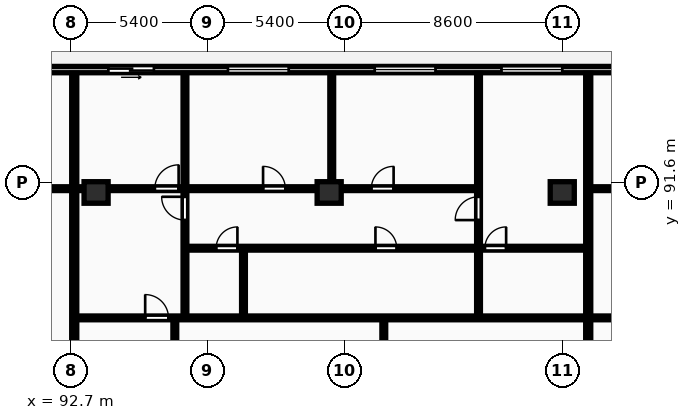
"""IFC4 building model, lengths in metres.
Left out: names, types, materials, properties, quantities, classifications, styles, units other than length and angle.
Written with IfcOpenShell. Run it as: python <this file> out.ifc"""

import sys

from ifc_helpers import new_model, si_unit, direction, frame, frame_2d, origin, origin_2d, place, context, subcontext, project, spatial, rectangle, extrude, element, fill, save


model = new_model("IFC4")
c1 = context("Model", 3, precision=1e-05, world=origin(), true_north=direction((0.0, 1.0)))
c2 = subcontext(c1, "Body", "Model", "MODEL_VIEW")
j1 = project(units=[si_unit("LENGTHUNIT", "METRE"), si_unit("PLANEANGLEUNIT", "RADIAN")], contexts=[c1])
p1 = place(None, origin())
s1 = spatial("IfcSite", under=j1, at=p1, CompositionType="ELEMENT")
p2 = place(p1, origin())
s2 = spatial("IfcBuilding", under=s1, at=p2, CompositionType="ELEMENT")
p3 = place(p2, frame((0.0, 0.0, 132.8)))
s3 = spatial("IfcBuildingStorey", under=s2, at=p3, CompositionType="ELEMENT", Elevation=132.8)
for number, where, z_axis, x_axis in (
    (1, (93.7, 91.2, 0.0), (0.0, 0.0, 1.0), (1.0, 0.0, 0.0)),
    (2, (102.9, 91.2, 0.0), (0.0, 0.0, 1.0), (1.0, 0.0, 0.0)),
    (3, (112.1, 91.2, 0.0), (0.0, 0.0, 1.0), (1.0, 0.0, 0.0)),
):
    element("IfcColumn", number, at=place(p3, frame(where, z_axis=z_axis, x_axis=x_axis)), inside=s3, PredefinedType="COLUMN", context=c2, shape_type="SweptSolid", body=[
        extrude(rectangle(XDim=0.95, YDim=0.85, at=origin_2d()), origin(), (0.0, 0.0, 1.0), 3.25),
    ])
p4 = place(p3, frame((130.6, 96.05, 0.0), z_axis=(0.0, 0.0, 1.0), x_axis=(-1.0, 0.0, 0.0)))
e4 = element("IfcWall", 4, at=p4, inside=s3, PredefinedType="STANDARD", context=c2, shape_type="SweptSolid", body=[
    extrude(rectangle(XDim=73.0, YDim=0.25, at=frame_2d((36.5, 0.0))), origin(), (0.0, 0.0, 1.0), 2.97),
])
p5 = place(p4, frame((68.591, 0.0, 0.0)))
e5 = element("IfcOpeningElement", 5, at=p5, cuts=e4, PredefinedType="OPENING", context=c2, shape_type="SweptSolid", body=[
    extrude(rectangle(XDim=1.8, YDim=2.2, at=frame_2d((0.9, 1.1))), frame((0.0, 0.135, 0.0), z_axis=(0.0, -1.0, 0.0), x_axis=(1.0, 0.0, 0.0)), (0.0, 0.0, 1.0), 0.27),
])
p6 = place(p4, frame((60.092, 0.0, 0.85)))
e6 = element("IfcOpeningElement", 6, at=p6, cuts=e4, PredefinedType="OPENING", context=c2, shape_type="SweptSolid", body=[
    extrude(rectangle(XDim=2.4, YDim=1.9, at=frame_2d((1.2, 0.95))), frame((0.0, 0.135, 0.0), z_axis=(0.0, -1.0, 0.0), x_axis=(1.0, 0.0, 0.0)), (0.0, 0.0, 1.0), 0.27),
])
p7 = place(p4, frame((51.405, 0.0, 0.0)))
e7 = element("IfcOpeningElement", 7, at=p7, cuts=e4, PredefinedType="OPENING", context=c2, shape_type="SweptSolid", body=[
    extrude(rectangle(XDim=1.8, YDim=2.2, at=frame_2d((0.9, 1.1))), frame((0.0, 0.135, 0.0), z_axis=(0.0, -1.0, 0.0), x_axis=(1.0, 0.0, 0.0)), (0.0, 0.0, 1.0), 0.27),
])
p8 = place(p4, frame((41.925, 0.0, 0.85)))
e8 = element("IfcOpeningElement", 8, at=p8, cuts=e4, PredefinedType="OPENING", context=c2, shape_type="SweptSolid", body=[
    extrude(rectangle(XDim=2.4, YDim=1.9, at=frame_2d((1.2, 0.95))), frame((0.0, 0.135, 0.0), z_axis=(0.0, -1.0, 0.0), x_axis=(1.0, 0.0, 0.0)), (0.0, 0.0, 1.0), 0.27),
])
p9 = place(p4, frame((29.296, 0.0, 0.85)))
e9 = element("IfcOpeningElement", 9, at=p9, cuts=e4, PredefinedType="OPENING", context=c2, shape_type="SweptSolid", body=[
    extrude(rectangle(XDim=2.4, YDim=1.9, at=frame_2d((1.2, 0.95))), frame((0.0, 0.135, 0.0), z_axis=(0.0, -1.0, 0.0), x_axis=(1.0, 0.0, 0.0)), (0.0, 0.0, 1.0), 0.27),
])
p10 = place(p4, frame((23.502, 0.0, 0.85)))
e10 = element("IfcOpeningElement", 10, at=p10, cuts=e4, PredefinedType="OPENING", context=c2, shape_type="SweptSolid", body=[
    extrude(rectangle(XDim=2.4, YDim=1.9, at=frame_2d((1.2, 0.95))), frame((0.0, 0.135, 0.0), z_axis=(0.0, -1.0, 0.0), x_axis=(1.0, 0.0, 0.0)), (0.0, 0.0, 1.0), 0.27),
])
p11 = place(p4, frame((34.617, 0.0, 0.0)))
e11 = element("IfcOpeningElement", 11, at=p11, cuts=e4, PredefinedType="OPENING", context=c2, shape_type="SweptSolid", body=[
    extrude(rectangle(XDim=1.8, YDim=2.2, at=frame_2d((0.9, 1.1))), frame((0.0, 0.135, 0.0), z_axis=(0.0, -1.0, 0.0), x_axis=(1.0, 0.0, 0.0)), (0.0, 0.0, 1.0), 0.27),
])
p12 = place(p4, frame((18.5, 0.0, 0.85)))
e12 = element("IfcOpeningElement", 12, at=p12, cuts=e4, PredefinedType="OPENING", context=c2, shape_type="SweptSolid", body=[
    extrude(rectangle(XDim=2.4, YDim=1.9, at=frame_2d((1.2, 0.95))), frame((0.0, 0.135, 0.0), z_axis=(0.0, -1.0, 0.0), x_axis=(1.0, 0.0, 0.0)), (0.0, 0.0, 1.0), 0.27),
])
p13 = place(p4, frame((9.458, 0.0, 0.85)))
e13 = element("IfcOpeningElement", 13, at=p13, cuts=e4, PredefinedType="OPENING", context=c2, shape_type="SweptSolid", body=[
    extrude(rectangle(XDim=2.4, YDim=1.9, at=frame_2d((1.2, 0.95))), frame((0.0, 0.135, 0.0), z_axis=(0.0, -1.0, 0.0), x_axis=(1.0, 0.0, 0.0)), (0.0, 0.0, 1.0), 0.27),
])
p14 = place(p4, frame((5.695, 0.0, 0.85)))
e14 = element("IfcOpeningElement", 14, at=p14, cuts=e4, PredefinedType="OPENING", context=c2, shape_type="SweptSolid", body=[
    extrude(rectangle(XDim=1.8, YDim=1.8, at=frame_2d((0.9, 0.9))), frame((0.0, 0.135, 0.0), z_axis=(0.0, -1.0, 0.0), x_axis=(1.0, 0.0, 0.0)), (0.0, 0.0, 1.0), 0.27),
])
p15 = place(p4, frame((14.225, 0.0, 0.0)))
e15 = element("IfcOpeningElement", 15, at=p15, cuts=e4, PredefinedType="OPENING", context=c2, shape_type="SweptSolid", body=[
    extrude(rectangle(XDim=1.8, YDim=2.2, at=frame_2d((0.9, 1.1))), frame((0.0, 0.135, 0.0), z_axis=(0.0, -1.0, 0.0), x_axis=(1.0, 0.0, 0.0)), (0.0, 0.0, 1.0), 0.27),
])
p16 = place(p4, frame((1.245, 0.0, 0.85)))
e16 = element("IfcOpeningElement", 16, at=p16, cuts=e4, PredefinedType="OPENING", context=c2, shape_type="SweptSolid", body=[
    extrude(rectangle(XDim=2.4, YDim=1.9, at=frame_2d((1.2, 0.95))), frame((0.0, 0.135, 0.0), z_axis=(0.0, -1.0, 0.0), x_axis=(1.0, 0.0, 0.0)), (0.0, 0.0, 1.0), 0.27),
])
p17 = place(p3, frame((92.837, 69.83, 0.0), z_axis=(0.0, 0.0, 1.0), x_axis=(0.0, 1.0, 0.0)))
e17 = element("IfcWall", 17, at=p17, inside=s3, PredefinedType="PARTITIONING", context=c2, shape_type="SweptSolid", body=[
    extrude(rectangle(XDim=26.07, YDim=0.2, at=frame_2d((13.035, 0.0))), origin(), (0.0, 0.0, 1.0), 2.97),
])
p18 = place(p3, frame((74.317, 91.35, 0.0), z_axis=(0.0, 0.0, 1.0), x_axis=(1.0, 0.0, 0.0)))
e18 = element("IfcWall", 18, at=p18, inside=s3, PredefinedType="PARTITIONING", context=c2, shape_type="SweptSolid", body=[
    extrude(rectangle(XDim=18.44, YDim=0.15, at=frame_2d((9.22, 0.0))), origin(), (0.0, 0.0, 1.0), 2.663),
])
p19 = place(p18, frame((6.725, 0.0, 0.0)))
e19 = element("IfcOpeningElement", 19, at=p19, cuts=e18, PredefinedType="OPENING", context=c2, shape_type="SweptSolid", body=[
    extrude(rectangle(XDim=0.94, YDim=2.1, at=frame_2d((0.47, 1.05))), frame((0.0, 0.085, 0.0), z_axis=(0.0, -1.0, 0.0), x_axis=(1.0, 0.0, 0.0)), (0.0, 0.0, 1.0), 0.17),
])
p20 = place(p18, frame((11.938, 0.0, 0.0)))
e20 = element("IfcOpeningElement", 20, at=p20, cuts=e18, PredefinedType="OPENING", context=c2, shape_type="SweptSolid", body=[
    extrude(rectangle(XDim=0.94, YDim=2.1, at=frame_2d((0.47, 1.05))), frame((0.0, 0.085, 0.0), z_axis=(0.0, -1.0, 0.0), x_axis=(1.0, 0.0, 0.0)), (0.0, 0.0, 1.0), 0.17),
])
p21 = place(p3, frame((113.125, 69.83, 0.0), z_axis=(0.0, 0.0, 1.0), x_axis=(0.0, 1.0, 0.0)))
e21 = element("IfcWall", 21, at=p21, inside=s3, PredefinedType="PARTITIONING", context=c2, shape_type="SweptSolid", body=[
    extrude(rectangle(XDim=26.07, YDim=0.2, at=frame_2d((13.035, 0.0))), origin(), (0.0, 0.0, 1.0), 2.97),
])
p22 = place(p3, frame((105.056, 69.81, 0.0), z_axis=(0.0, 0.0, 1.0), x_axis=(0.0, 1.0, 0.0)))
e22 = element("IfcWall", 22, at=p22, inside=s3, PredefinedType="PARTITIONING", context=c2, shape_type="SweptSolid", body=[
    extrude(rectangle(XDim=16.4, YDim=0.15, at=frame_2d((8.2, 0.0))), origin(), (0.0, 0.0, 1.0), 2.97),
])
p23 = place(p22, frame((6.93, 0.0, 0.0)))
e23 = element("IfcOpeningElement", 23, at=p23, cuts=e22, PredefinedType="OPENING", context=c2, shape_type="SweptSolid", body=[
    extrude(rectangle(XDim=0.84, YDim=2.04, at=frame_2d((0.42, 1.02))), frame((0.0, 0.085, 0.0), z_axis=(0.0, -1.0, 0.0), x_axis=(1.0, 0.0, 0.0)), (0.0, 0.0, 1.0), 0.17),
])
p24 = place(p22, frame((11.582, 0.0, 0.0)))
e24 = element("IfcOpeningElement", 24, at=p24, cuts=e22, PredefinedType="OPENING", context=c2, shape_type="SweptSolid", body=[
    extrude(rectangle(XDim=0.88, YDim=2.06, at=frame_2d((0.44, 1.03))), frame((0.0, 0.085, 0.0), z_axis=(0.0, -1.0, 0.0), x_axis=(1.0, 0.0, 0.0)), (0.0, 0.0, 1.0), 0.17),
])
p25 = place(p3, frame((96.808, 69.81, 0.0), z_axis=(0.0, 0.0, 1.0), x_axis=(0.0, 1.0, 0.0)))
e25 = element("IfcWall", 25, at=p25, inside=s3, PredefinedType="PARTITIONING", context=c2, shape_type="SweptSolid", body=[
    extrude(rectangle(XDim=16.4, YDim=0.15, at=frame_2d((8.2, 0.0))), origin(), (0.0, 0.0, 1.0), 2.97),
])
p26 = place(p25, frame((6.89, 0.0, 0.0)))
e26 = element("IfcOpeningElement", 26, at=p26, cuts=e25, PredefinedType="OPENING", context=c2, shape_type="SweptSolid", body=[
    extrude(rectangle(XDim=0.88, YDim=2.06, at=frame_2d((0.44, 1.03))), frame((0.0, 0.085, 0.0), z_axis=(0.0, -1.0, 0.0), x_axis=(1.0, 0.0, 0.0)), (0.0, 0.0, 1.0), 0.17),
])
p27 = place(p3, frame((99.518, 86.29, 0.0), z_axis=(0.0, 0.0, 1.0), x_axis=(0.0, 1.0, 0.0)))
e27 = element("IfcWall", 27, at=p27, inside=s3, PredefinedType="PARTITIONING", context=c2, shape_type="SweptSolid", body=[
    extrude(rectangle(XDim=2.69, YDim=0.15, at=frame_2d((1.345, 0.0))), origin(), (0.0, 0.0, 1.0), 2.97),
])
p28 = place(p3, frame((103.001, 91.43, 0.0), z_axis=(0.0, 0.0, 1.0), x_axis=(0.0, 1.0, 0.0)))
e28 = element("IfcWall", 28, at=p28, inside=s3, PredefinedType="PARTITIONING", context=c2, shape_type="SweptSolid", body=[
    extrude(rectangle(XDim=4.47, YDim=0.15, at=frame_2d((2.235, 0.0))), origin(), (0.0, 0.0, 1.0), 2.97),
])
p29 = place(p3, frame((97.208, 86.29, 0.0), z_axis=(0.0, 0.0, 1.0), x_axis=(0.0, 1.0, 0.0)))
e29 = element("IfcWall", 29, at=p29, inside=s3, PredefinedType="PARTITIONING", context=c2, shape_type="SweptSolid", body=[
    extrude(rectangle(XDim=9.61, YDim=0.15, at=frame_2d((4.805, 0.0))), origin(), (0.0, 0.0, 1.0), 2.97),
])
p30 = place(p29, frame((3.82, 0.0, 0.0)))
e30 = element("IfcOpeningElement", 30, at=p30, cuts=e29, PredefinedType="OPENING", context=c2, shape_type="SweptSolid", body=[
    extrude(rectangle(XDim=0.92, YDim=2.08, at=frame_2d((0.46, 1.04))), frame((0.0, 0.085, 0.0), z_axis=(0.0, -1.0, 0.0), x_axis=(1.0, 0.0, 0.0)), (0.0, 0.0, 1.0), 0.17),
])
p31 = place(p3, frame((108.795, 86.29, 0.0), z_axis=(0.0, 0.0, 1.0), x_axis=(0.0, 1.0, 0.0)))
e31 = element("IfcWall", 31, at=p31, inside=s3, PredefinedType="PARTITIONING", context=c2, shape_type="SweptSolid", body=[
    extrude(rectangle(XDim=2.69, YDim=0.15, at=frame_2d((1.345, 0.0))), origin(), (0.0, 0.0, 1.0), 2.97),
])
p32 = place(p3, frame((108.795, 89.02, 0.0), z_axis=(0.0, 0.0, 1.0), x_axis=(0.0, 1.0, 0.0)))
e32 = element("IfcWall", 32, at=p32, inside=s3, PredefinedType="PARTITIONING", context=c2, shape_type="SweptSolid", body=[
    extrude(rectangle(XDim=6.88, YDim=0.15, at=frame_2d((3.44, 0.0))), origin(), (0.0, 0.0, 1.0), 2.97),
])
p33 = place(p32, frame((1.09, 0.0, 0.0)))
e33 = element("IfcOpeningElement", 33, at=p33, cuts=e32, PredefinedType="OPENING", context=c2, shape_type="SweptSolid", body=[
    extrude(rectangle(XDim=0.92, YDim=2.08, at=frame_2d((0.46, 1.04))), frame((0.0, 0.085, 0.0), z_axis=(0.0, -1.0, 0.0), x_axis=(1.0, 0.0, 0.0)), (0.0, 0.0, 1.0), 0.17),
])
p34 = place(p3, frame((97.248, 89.0, 0.0), z_axis=(0.0, 0.0, 1.0), x_axis=(1.0, 0.0, 0.0)))
e34 = element("IfcWall", 34, at=p34, inside=s3, PredefinedType="PARTITIONING", context=c2, shape_type="SweptSolid", body=[
    extrude(rectangle(XDim=15.797, YDim=0.15, at=frame_2d((7.899, 0.0))), origin(), (0.0, 0.0, 1.0), 2.97),
])
p35 = place(p34, frame((1.191, 0.0, 0.0)))
e35 = element("IfcOpeningElement", 35, at=p35, cuts=e34, PredefinedType="OPENING", context=c2, shape_type="SweptSolid", body=[
    extrude(rectangle(XDim=0.84, YDim=2.04, at=frame_2d((0.42, 1.02))), frame((0.0, 0.085, 0.0), z_axis=(0.0, -1.0, 0.0), x_axis=(1.0, 0.0, 0.0)), (0.0, 0.0, 1.0), 0.17),
])
p36 = place(p34, frame((7.479, 0.0, 0.0)))
e36 = element("IfcOpeningElement", 36, at=p36, cuts=e34, PredefinedType="OPENING", context=c2, shape_type="SweptSolid", body=[
    extrude(rectangle(XDim=0.84, YDim=2.04, at=frame_2d((0.42, 1.02))), frame((0.0, 0.085, 0.0), z_axis=(0.0, -1.0, 0.0), x_axis=(1.0, 0.0, 0.0)), (0.0, 0.0, 1.0), 0.17),
])
p37 = place(p34, frame((11.798, 0.0, 0.0)))
e37 = element("IfcOpeningElement", 37, at=p37, cuts=e34, PredefinedType="OPENING", context=c2, shape_type="SweptSolid", body=[
    extrude(rectangle(XDim=0.84, YDim=2.04, at=frame_2d((0.42, 1.02))), frame((0.0, 0.085, 0.0), z_axis=(0.0, -1.0, 0.0), x_axis=(1.0, 0.0, 0.0)), (0.0, 0.0, 1.0), 0.17),
])
p38 = place(p3, frame((92.917, 86.25, 0.0), z_axis=(0.0, 0.0, 1.0), x_axis=(1.0, 0.0, 0.0)))
e38 = element("IfcWall", 38, at=p38, inside=s3, PredefinedType="PARTITIONING", context=c2, shape_type="SweptSolid", body=[
    extrude(rectangle(XDim=20.127, YDim=0.15, at=frame_2d((10.064, 0.0))), origin(), (0.0, 0.0, 1.0), 2.97),
])
p39 = place(p38, frame((2.72, 0.0, 0.0)))
e39 = element("IfcOpeningElement", 39, at=p39, cuts=e38, PredefinedType="OPENING", context=c2, shape_type="SweptSolid", body=[
    extrude(rectangle(XDim=0.92, YDim=2.08, at=frame_2d((0.46, 1.04))), frame((0.0, 0.085, 0.0), z_axis=(0.0, -1.0, 0.0), x_axis=(1.0, 0.0, 0.0)), (0.0, 0.0, 1.0), 0.17),
])
p40 = place(p3, frame((92.917, 91.35, 0.0), z_axis=(0.0, 0.0, 1.0), x_axis=(1.0, 0.0, 0.0)))
e40 = element("IfcWall", 40, at=p40, inside=s3, PredefinedType="PARTITIONING", context=c2, shape_type="SweptSolid", body=[
    extrude(rectangle(XDim=15.877, YDim=0.15, at=frame_2d((7.939, 0.0))), origin(), (0.0, 0.0, 1.0), 2.663),
])
p41 = place(p40, frame((3.1, 0.0, 0.0)))
e41 = element("IfcOpeningElement", 41, at=p41, cuts=e40, PredefinedType="OPENING", context=c2, shape_type="SweptSolid", body=[
    extrude(rectangle(XDim=0.94, YDim=2.1, at=frame_2d((0.47, 1.05))), frame((0.0, 0.085, 0.0), z_axis=(0.0, -1.0, 0.0), x_axis=(1.0, 0.0, 0.0)), (0.0, 0.0, 1.0), 0.17),
])
p42 = place(p40, frame((7.373, 0.0, 0.0)))
e42 = element("IfcOpeningElement", 42, at=p42, cuts=e40, PredefinedType="OPENING", context=c2, shape_type="SweptSolid", body=[
    extrude(rectangle(XDim=0.88, YDim=2.06, at=frame_2d((0.44, 1.03))), frame((0.0, 0.085, 0.0), z_axis=(0.0, -1.0, 0.0), x_axis=(1.0, 0.0, 0.0)), (0.0, 0.0, 1.0), 0.17),
])
p43 = place(p40, frame((11.646, 0.0, 0.0)))
e43 = element("IfcOpeningElement", 43, at=p43, cuts=e40, PredefinedType="OPENING", context=c2, shape_type="SweptSolid", body=[
    extrude(rectangle(XDim=0.88, YDim=2.06, at=frame_2d((0.44, 1.03))), frame((0.0, 0.085, 0.0), z_axis=(0.0, -1.0, 0.0), x_axis=(1.0, 0.0, 0.0)), (0.0, 0.0, 1.0), 0.17),
])
p44 = place(p3, frame((113.205, 86.25, 0.0), z_axis=(0.0, 0.0, 1.0), x_axis=(1.0, 0.0, 0.0)))
e44 = element("IfcWall", 44, at=p44, inside=s3, PredefinedType="PARTITIONING", context=c2, shape_type="SweptSolid", body=[
    extrude(rectangle(XDim=17.315, YDim=0.15, at=frame_2d((8.657, 0.0))), origin(), (0.0, 0.0, 1.0), 2.97),
])
p45 = place(p44, frame((2.72, 0.0, 0.0)))
e45 = element("IfcOpeningElement", 45, at=p45, cuts=e44, PredefinedType="OPENING", context=c2, shape_type="SweptSolid", body=[
    extrude(rectangle(XDim=0.92, YDim=2.08, at=frame_2d((0.46, 1.04))), frame((0.0, 0.085, 0.0), z_axis=(0.0, -1.0, 0.0), x_axis=(1.0, 0.0, 0.0)), (0.0, 0.0, 1.0), 0.17),
])
p46 = place(p3, frame((113.205, 91.35, 0.0), z_axis=(0.0, 0.0, 1.0), x_axis=(1.0, 0.0, 0.0)))
e46 = element("IfcWall", 46, at=p46, inside=s3, PredefinedType="PARTITIONING", context=c2, shape_type="SweptSolid", body=[
    extrude(rectangle(XDim=12.625, YDim=0.15, at=frame_2d((6.312, 0.0))), origin(), (0.0, 0.0, 1.0), 2.663),
])
p47 = place(p46, frame((3.31, 0.0, 0.0)))
e47 = element("IfcOpeningElement", 47, at=p47, cuts=e46, PredefinedType="OPENING", context=c2, shape_type="SweptSolid", body=[
    extrude(rectangle(XDim=0.94, YDim=2.1, at=frame_2d((0.47, 1.05))), frame((0.0, 0.085, 0.0), z_axis=(0.0, -1.0, 0.0), x_axis=(1.0, 0.0, 0.0)), (0.0, 0.0, 1.0), 0.17),
])
p48 = place(p46, frame((4.72, 0.0, 0.0)))
e48 = element("IfcOpeningElement", 48, at=p48, cuts=e46, PredefinedType="OPENING", context=c2, shape_type="SweptSolid", body=[
    extrude(rectangle(XDim=0.88, YDim=2.06, at=frame_2d((0.44, 1.03))), frame((0.0, 0.085, 0.0), z_axis=(0.0, -1.0, 0.0), x_axis=(1.0, 0.0, 0.0)), (0.0, 0.0, 1.0), 0.17),
])
p49 = place(p46, frame((9.242, 0.0, 0.0)))
e49 = element("IfcOpeningElement", 49, at=p49, cuts=e46, PredefinedType="OPENING", context=c2, shape_type="SweptSolid", body=[
    extrude(rectangle(XDim=0.88, YDim=2.06, at=frame_2d((0.44, 1.03))), frame((0.0, 0.085, 0.0), z_axis=(0.0, -1.0, 0.0), x_axis=(1.0, 0.0, 0.0)), (0.0, 0.0, 1.0), 0.17),
])
p50 = place(p9, origin())
e50 = element("IfcWindow", 50, at=p50, inside=s3, PartitioningType="DOUBLE_PANEL_VERTICAL", PredefinedType="WINDOW", context=c2, shape_type="SweptSolid", body=[
    extrude(rectangle(XDim=2.4, YDim=1.9, at=frame_2d((1.2, 0.95))), frame((0.0, 0.03, 0.0), z_axis=(0.0, -1.0, 0.0), x_axis=(1.0, 0.0, 0.0)), (0.0, 0.0, 1.0), 0.06),
])
fill(e9, e50)
p51 = place(p10, origin())
e51 = element("IfcWindow", 51, at=p51, inside=s3, PartitioningType="DOUBLE_PANEL_VERTICAL", PredefinedType="WINDOW", context=c2, shape_type="SweptSolid", body=[
    extrude(rectangle(XDim=2.4, YDim=1.9, at=frame_2d((1.2, 0.95))), frame((0.0, 0.03, 0.0), z_axis=(0.0, -1.0, 0.0), x_axis=(1.0, 0.0, 0.0)), (0.0, 0.0, 1.0), 0.06),
])
fill(e10, e51)
p52 = place(p11, origin())
e52 = element("IfcDoor", 52, at=p52, inside=s3, OperationType="SLIDING_TO_LEFT", PredefinedType="DOOR", context=c2, shape_type="SweptSolid", body=[
    extrude(rectangle(XDim=1.8, YDim=2.2, at=frame_2d((0.9, 1.1))), frame((0.0, 0.025, 0.0), z_axis=(0.0, -1.0, 0.0), x_axis=(1.0, 0.0, 0.0)), (0.0, 0.0, 1.0), 0.05),
])
fill(e11, e52)
p53 = place(p12, origin())
e53 = element("IfcWindow", 53, at=p53, inside=s3, PartitioningType="DOUBLE_PANEL_VERTICAL", PredefinedType="WINDOW", context=c2, shape_type="SweptSolid", body=[
    extrude(rectangle(XDim=2.4, YDim=1.9, at=frame_2d((1.2, 0.95))), frame((0.0, 0.03, 0.0), z_axis=(0.0, -1.0, 0.0), x_axis=(1.0, 0.0, 0.0)), (0.0, 0.0, 1.0), 0.06),
])
fill(e12, e53)
p54 = place(p30, origin())
e54 = element("IfcDoor", 54, at=p54, inside=s3, OperationType="SINGLE_SWING_RIGHT", PredefinedType="DOOR", context=c2, shape_type="SweptSolid", body=[
    extrude(rectangle(XDim=0.92, YDim=2.08, at=frame_2d((0.46, 1.04))), frame((0.0, 0.025, 0.0), z_axis=(0.0, -1.0, 0.0), x_axis=(1.0, 0.0, 0.0)), (0.0, 0.0, 1.0), 0.05),
])
fill(e30, e54)
p55 = place(p33, origin())
e55 = element("IfcDoor", 55, at=p55, inside=s3, OperationType="SINGLE_SWING_LEFT", PredefinedType="DOOR", context=c2, shape_type="SweptSolid", body=[
    extrude(rectangle(XDim=0.92, YDim=2.08, at=frame_2d((0.46, 1.04))), frame((0.0, 0.025, 0.0), z_axis=(0.0, -1.0, 0.0), x_axis=(1.0, 0.0, 0.0)), (0.0, 0.0, 1.0), 0.05),
])
fill(e33, e55)
p56 = place(p35, origin())
e56 = element("IfcDoor", 56, at=p56, inside=s3, OperationType="SINGLE_SWING_RIGHT", PredefinedType="DOOR", context=c2, shape_type="SweptSolid", body=[
    extrude(rectangle(XDim=0.84, YDim=2.04, at=frame_2d((0.42, 1.02))), frame((0.0, 0.025, 0.0), z_axis=(0.0, -1.0, 0.0), x_axis=(1.0, 0.0, 0.0)), (0.0, 0.0, 1.0), 0.05),
])
fill(e35, e56)
p57 = place(p36, origin())
e57 = element("IfcDoor", 57, at=p57, inside=s3, OperationType="SINGLE_SWING_LEFT", PredefinedType="DOOR", context=c2, shape_type="SweptSolid", body=[
    extrude(rectangle(XDim=0.84, YDim=2.04, at=frame_2d((0.42, 1.02))), frame((0.0, 0.025, 0.0), z_axis=(0.0, -1.0, 0.0), x_axis=(1.0, 0.0, 0.0)), (0.0, 0.0, 1.0), 0.05),
])
fill(e36, e57)
p58 = place(p37, origin())
e58 = element("IfcDoor", 58, at=p58, inside=s3, OperationType="SINGLE_SWING_RIGHT", PredefinedType="DOOR", context=c2, shape_type="SweptSolid", body=[
    extrude(rectangle(XDim=0.84, YDim=2.04, at=frame_2d((0.42, 1.02))), frame((0.0, 0.025, 0.0), z_axis=(0.0, -1.0, 0.0), x_axis=(1.0, 0.0, 0.0)), (0.0, 0.0, 1.0), 0.05),
])
fill(e37, e58)
p59 = place(p39, origin())
e59 = element("IfcDoor", 59, at=p59, inside=s3, OperationType="SINGLE_SWING_LEFT", PredefinedType="DOOR", context=c2, shape_type="SweptSolid", body=[
    extrude(rectangle(XDim=0.92, YDim=2.08, at=frame_2d((0.46, 1.04))), frame((0.0, 0.025, 0.0), z_axis=(0.0, -1.0, 0.0), x_axis=(1.0, 0.0, 0.0)), (0.0, 0.0, 1.0), 0.05),
])
fill(e39, e59)
p60 = place(p41, origin())
e60 = element("IfcDoor", 60, at=p60, inside=s3, OperationType="SINGLE_SWING_RIGHT", PredefinedType="DOOR", context=c2, shape_type="SweptSolid", body=[
    extrude(rectangle(XDim=0.94, YDim=2.1, at=frame_2d((0.47, 1.05))), frame((0.0, 0.025, 0.0), z_axis=(0.0, -1.0, 0.0), x_axis=(1.0, 0.0, 0.0)), (0.0, 0.0, 1.0), 0.05),
])
fill(e41, e60)
p61 = place(p42, origin())
e61 = element("IfcDoor", 61, at=p61, inside=s3, OperationType="SINGLE_SWING_LEFT", PredefinedType="DOOR", context=c2, shape_type="SweptSolid", body=[
    extrude(rectangle(XDim=0.88, YDim=2.06, at=frame_2d((0.44, 1.03))), frame((0.0, 0.025, 0.0), z_axis=(0.0, -1.0, 0.0), x_axis=(1.0, 0.0, 0.0)), (0.0, 0.0, 1.0), 0.05),
])
fill(e42, e61)
p62 = place(p43, origin())
e62 = element("IfcDoor", 62, at=p62, inside=s3, OperationType="SINGLE_SWING_RIGHT", PredefinedType="DOOR", context=c2, shape_type="SweptSolid", body=[
    extrude(rectangle(XDim=0.88, YDim=2.06, at=frame_2d((0.44, 1.03))), frame((0.0, 0.025, 0.0), z_axis=(0.0, -1.0, 0.0), x_axis=(1.0, 0.0, 0.0)), (0.0, 0.0, 1.0), 0.05),
])
fill(e43, e62)
save(model, sys.argv[1])
